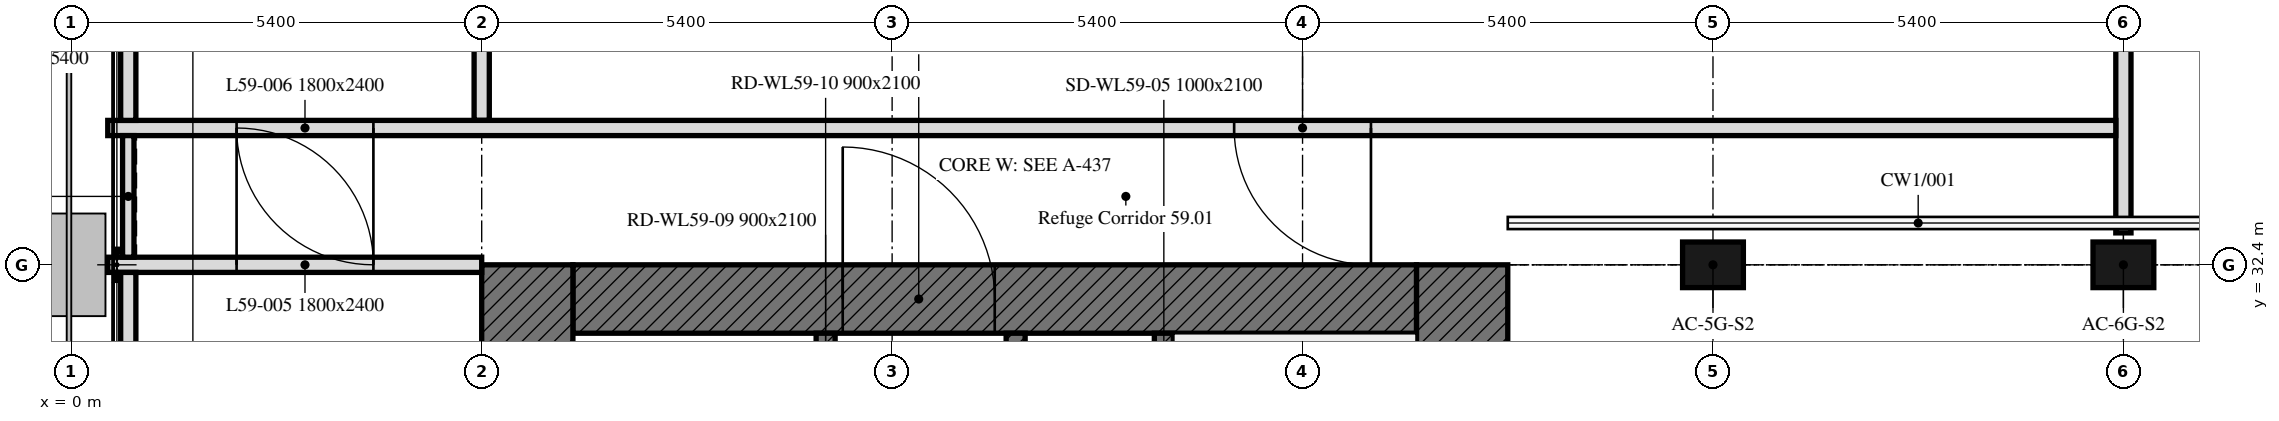
"""IFC4 building model, lengths in metres.
Left out: names, types, materials, properties, quantities, classifications, styles, units other than length and angle.
Written with IfcOpenShell. Run it as: python <this file> out.ifc"""

import sys

from ifc_helpers import new_model, si_unit, direction, frame, frame_2d, origin, origin_2d, place, context, subcontext, project, spatial, rectangle, extrude, element, fill, save


model = new_model("IFC4")
c1 = context("Model", 3, precision=1e-05, world=origin(), true_north=direction((0.0, 1.0)))
c2 = subcontext(c1, "Body", "Model", "MODEL_VIEW")
j1 = project(units=[si_unit("LENGTHUNIT", "METRE"), si_unit("PLANEANGLEUNIT", "RADIAN")], contexts=[c1])
p1 = place(None, origin())
s1 = spatial("IfcSite", under=j1, at=p1, CompositionType="ELEMENT")
p2 = place(p1, origin())
s2 = spatial("IfcBuilding", under=s1, at=p2, CompositionType="ELEMENT")
p3 = place(p2, frame((0.0, 0.0, 233.5)))
s3 = spatial("IfcBuildingStorey", under=s2, at=p3, CompositionType="ELEMENT", Elevation=233.5)
for number, where, z_axis, x_axis in (
    (1, (21.6, 32.4, 0.0), (0.0, 0.0, 1.0), (1.0, 0.0, 0.0)),
    (2, (27.0, 32.4, 0.0), (0.0, 0.0, 1.0), (1.0, 0.0, 0.0)),
):
    element("IfcColumn", number, at=place(p3, frame(where, z_axis=z_axis, x_axis=x_axis)), inside=s3, PredefinedType="COLUMN", context=c2, shape_type="SweptSolid", body=[
        extrude(rectangle(XDim=0.8, YDim=0.6, at=origin_2d()), origin(), (0.0, 0.0, 1.0), 9.3),
    ])
p4 = place(p3, frame((6.6, 31.95, 0.0), z_axis=(0.0, 0.0, 1.0), x_axis=(1.0, 0.0, 0.0)))
e3 = element("IfcWall", 3, at=p4, inside=s3, PredefinedType="SOLIDWALL", context=c2, shape_type="SweptSolid", body=[
    extrude(rectangle(XDim=11.1, YDim=0.9, at=frame_2d((5.55, 0.0))), origin(), (0.0, 0.0, 1.0), 9.3),
])
p5 = place(p4, frame((3.55, 0.0, 0.0)))
e4 = element("IfcOpeningElement", 4, at=p5, cuts=e3, PredefinedType="OPENING", context=c2, shape_type="SweptSolid", body=[
    extrude(rectangle(XDim=2.0, YDim=2.4, at=frame_2d((1.0, 1.2))), frame((0.0, 0.45, 0.0), z_axis=(0.0, -1.0, 0.0), x_axis=(1.0, 0.0, 0.0)), (0.0, 0.0, 1.0), 0.9),
])
for number, where, z_axis, x_axis in (
    (5, (6.0, 16.2, 0.0), (0.0, 0.0, 1.0), (0.0, 1.0, 0.0)),
    (6, (18.3, 32.4, 0.0), (0.0, 0.0, 1.0), (0.0, -1.0, 0.0)),
):
    element("IfcWall", number, at=place(p3, frame(where, z_axis=z_axis, x_axis=x_axis)), inside=s3, PredefinedType="SOLIDWALL", context=c2, shape_type="SweptSolid", body=[
        extrude(rectangle(XDim=16.2, YDim=1.2, at=frame_2d((8.1, 0.0))), origin(), (0.0, 0.0, 1.0), 9.3),
    ])
p6 = place(p3, frame((9.925, 17.1, 0.0), z_axis=(0.0, 0.0, 1.0), x_axis=(0.0, 1.0, 0.0)))
e7 = element("IfcWall", 7, at=p6, inside=s3, PredefinedType="SOLIDWALL", context=c2, shape_type="SweptSolid", body=[
    extrude(rectangle(XDim=14.4, YDim=0.25, at=frame_2d((7.2, 0.0))), origin(), (0.0, 0.0, 1.0), 9.3),
])
p7 = place(p6, frame((4.6, 0.0, 0.0)))
e8 = element("IfcOpeningElement", 8, at=p7, cuts=e7, PredefinedType="OPENING", context=c2, shape_type="SweptSolid", body=[
    extrude(rectangle(XDim=1.0, YDim=2.1, at=frame_2d((0.5, 1.05))), frame((0.0, 0.125, 0.0), z_axis=(0.0, -1.0, 0.0), x_axis=(1.0, 0.0, 0.0)), (0.0, 0.0, 1.0), 0.25),
])
p8 = place(p6, frame((7.062, 0.0, 0.0)))
e9 = element("IfcOpeningElement", 9, at=p8, cuts=e7, PredefinedType="OPENING", context=c2, shape_type="SweptSolid", body=[
    extrude(rectangle(XDim=1.2, YDim=2.1, at=frame_2d((0.6, 1.05))), frame((0.0, 0.125, 0.0), z_axis=(0.0, -1.0, 0.0), x_axis=(1.0, 0.0, 0.0)), (0.0, 0.0, 1.0), 0.25),
])
p9 = place(p6, frame((9.853, 0.0, 0.0)))
e10 = element("IfcOpeningElement", 10, at=p9, cuts=e7, PredefinedType="OPENING", context=c2, shape_type="SweptSolid", body=[
    extrude(rectangle(XDim=0.9, YDim=2.1, at=frame_2d((0.45, 1.05))), frame((0.0, 0.125, 0.0), z_axis=(0.0, -1.0, 0.0), x_axis=(1.0, 0.0, 0.0)), (0.0, 0.0, 1.0), 0.25),
])
p10 = place(p6, frame((11.667, 0.0, 0.0)))
e11 = element("IfcOpeningElement", 11, at=p10, cuts=e7, PredefinedType="OPENING", context=c2, shape_type="SweptSolid", body=[
    extrude(rectangle(XDim=0.9, YDim=2.1, at=frame_2d((0.45, 1.05))), frame((0.0, 0.125, 0.0), z_axis=(0.0, -1.0, 0.0), x_axis=(1.0, 0.0, 0.0)), (0.0, 0.0, 1.0), 0.25),
])
p11 = place(p6, frame((13.227, 0.0, 0.0)))
e12 = element("IfcOpeningElement", 12, at=p11, cuts=e7, PredefinedType="OPENING", context=c2, shape_type="SweptSolid", body=[
    extrude(rectangle(XDim=0.9, YDim=2.1, at=frame_2d((0.45, 1.05))), frame((0.0, 0.125, 0.0), z_axis=(0.0, -1.0, 0.0), x_axis=(1.0, 0.0, 0.0)), (0.0, 0.0, 1.0), 0.25),
])
p12 = place(p3, frame((14.375, 17.1, 0.0), z_axis=(0.0, 0.0, 1.0), x_axis=(0.0, 1.0, 0.0)))
e13 = element("IfcWall", 13, at=p12, inside=s3, PredefinedType="SOLIDWALL", context=c2, shape_type="SweptSolid", body=[
    extrude(rectangle(XDim=14.4, YDim=0.25, at=frame_2d((7.2, 0.0))), origin(), (0.0, 0.0, 1.0), 9.3),
])
p13 = place(p12, frame((13.15, 0.0, 0.0)))
e14 = element("IfcOpeningElement", 14, at=p13, cuts=e13, PredefinedType="OPENING", context=c2, shape_type="SweptSolid", body=[
    extrude(rectangle(XDim=1.0, YDim=2.1, at=frame_2d((0.5, 1.05))), frame((0.0, 0.125, 0.0), z_axis=(0.0, -1.0, 0.0), x_axis=(1.0, 0.0, 0.0)), (0.0, 0.0, 1.0), 0.25),
])
p14 = place(p3, frame((12.425, 29.4, 0.0), z_axis=(0.0, 0.0, 1.0), x_axis=(0.0, 1.0, 0.0)))
e15 = element("IfcWall", 15, at=p14, inside=s3, PredefinedType="SOLIDWALL", context=c2, shape_type="SweptSolid", body=[
    extrude(rectangle(XDim=2.1, YDim=0.25, at=frame_2d((1.05, 0.0))), origin(), (0.0, 0.0, 1.0), 9.3),
])
p15 = place(p14, frame((0.5, 0.0, 0.0)))
e16 = element("IfcOpeningElement", 16, at=p15, cuts=e15, PredefinedType="OPENING", context=c2, shape_type="SweptSolid", body=[
    extrude(rectangle(XDim=1.0, YDim=2.1, at=frame_2d((0.5, 1.05))), frame((0.0, 0.125, 0.0), z_axis=(0.0, -1.0, 0.0), x_axis=(1.0, 0.0, 0.0)), (0.0, 0.0, 1.0), 0.25),
])
p16 = place(p3, frame((5.4, 34.3, 0.0), z_axis=(0.0, 0.0, 1.0), x_axis=(0.0, 1.0, 0.0)))
e17 = element("IfcWall", 17, at=p16, inside=s3, PredefinedType="PARTITIONING", context=c2, shape_type="SweptSolid", body=[
    extrude(rectangle(XDim=3.049, YDim=0.2, at=frame_2d((1.525, 0.0))), origin(), (0.0, 0.0, 1.0), 9.3),
])
p17 = place(p3, frame((27.0, 37.25, 0.0), z_axis=(0.0, 0.0, 1.0), x_axis=(0.0, -1.0, 0.0)))
e18 = element("IfcWall", 18, at=p17, inside=s3, PredefinedType="PARTITIONING", context=c2, shape_type="SweptSolid", body=[
    extrude(rectangle(XDim=4.43, YDim=0.2, at=frame_2d((2.215, 0.0))), origin(), (0.0, 0.0, 1.0), 9.3),
])
p18 = place(p3, frame((0.48, 32.4, 0.0), z_axis=(0.0, 0.0, 1.0), x_axis=(1.0, 0.0, 0.0)))
e19 = element("IfcWall", 19, at=p18, inside=s3, PredefinedType="PARTITIONING", context=c2, shape_type="SweptSolid", body=[
    extrude(rectangle(XDim=4.92, YDim=0.2, at=frame_2d((2.46, 0.0))), origin(), (0.0, 0.0, 1.0), 8.55),
])
p19 = place(p18, frame((1.695, 0.0, 0.0)))
e20 = element("IfcOpeningElement", 20, at=p19, cuts=e19, PredefinedType="OPENING", context=c2, shape_type="SweptSolid", body=[
    extrude(rectangle(XDim=1.8, YDim=2.4, at=frame_2d((0.9, 1.2))), frame((0.0, 0.1, 0.0), z_axis=(0.0, -1.0, 0.0), x_axis=(1.0, 0.0, 0.0)), (0.0, 0.0, 1.0), 0.2),
])
p20 = place(p3, frame((26.9, 34.2, 0.0), z_axis=(0.0, 0.0, 1.0), x_axis=(-1.0, 0.0, 0.0)))
e21 = element("IfcWall", 21, at=p20, inside=s3, PredefinedType="PARTITIONING", context=c2, shape_type="SweptSolid", body=[
    extrude(rectangle(XDim=26.42, YDim=0.2, at=frame_2d((13.21, 0.0))), origin(), (0.0, 0.0, 1.0), 9.3),
])
p21 = place(p20, frame((22.925, 0.0, 0.0)))
e22 = element("IfcOpeningElement", 22, at=p21, cuts=e21, PredefinedType="OPENING", context=c2, shape_type="SweptSolid", body=[
    extrude(rectangle(XDim=1.8, YDim=2.4, at=frame_2d((0.9, 1.2))), frame((0.0, 0.1, 0.0), z_axis=(0.0, -1.0, 0.0), x_axis=(1.0, 0.0, 0.0)), (0.0, 0.0, 1.0), 0.2),
])
p22 = place(p20, frame((9.8, 0.0, 0.0)))
e23 = element("IfcOpeningElement", 23, at=p22, cuts=e21, PredefinedType="OPENING", context=c2, shape_type="SweptSolid", body=[
    extrude(rectangle(XDim=1.8, YDim=2.4, at=frame_2d((0.9, 1.2))), frame((0.0, 0.1, 0.0), z_axis=(0.0, -1.0, 0.0), x_axis=(1.0, 0.0, 0.0)), (0.0, 0.0, 1.0), 0.2),
])
p23 = place(p3, frame((0.75, 34.1, 0.0), z_axis=(0.0, 0.0, 1.0), x_axis=(0.0, -1.0, 0.0)))
e24 = element("IfcWall", 24, at=p23, inside=s3, PredefinedType="PARTITIONING", context=c2, shape_type="SweptSolid", body=[
    extrude(rectangle(XDim=1.6, YDim=0.15, at=frame_2d((0.8, 0.0))), origin(), (0.0, 0.0, 1.0), 9.3),
])
p24 = place(p3, frame((0.75, 32.3, 0.0), z_axis=(0.0, 0.0, 1.0), x_axis=(0.0, -1.0, 0.0)))
e25 = element("IfcWall", 25, at=p24, inside=s3, PredefinedType="PARTITIONING", context=c2, shape_type="SweptSolid", body=[
    extrude(rectangle(XDim=16.2, YDim=0.2, at=frame_2d((8.1, 0.0))), origin(), (0.0, 0.0, 1.0), 9.3),
])
p25 = place(p3, frame((0.75, 37.389, 0.0), z_axis=(0.0, 0.0, 1.0), x_axis=(0.0, -1.0, 0.0)))
e26 = element("IfcWall", 26, at=p25, inside=s3, PredefinedType="PARTITIONING", context=c2, shape_type="SweptSolid", body=[
    extrude(rectangle(XDim=3.089, YDim=0.2, at=frame_2d((1.544, 0.0))), origin(), (0.0, 0.0, 1.0), 9.3),
])
p26 = place(p5, origin())
e27 = element("IfcDoor", 27, at=p26, inside=s3, OperationType="DOUBLE_DOOR_SINGLE_SWING", PredefinedType="DOOR", context=c2, shape_type="SweptSolid", body=[
    extrude(rectangle(XDim=2.0, YDim=2.4, at=frame_2d((1.0, 1.2))), frame((0.0, 0.025, 0.0), z_axis=(0.0, -1.0, 0.0), x_axis=(1.0, 0.0, 0.0)), (0.0, 0.0, 1.0), 0.05),
])
fill(e4, e27)
p27 = place(p19, origin())
e28 = element("IfcDoor", 28, at=p27, inside=s3, OperationType="DOUBLE_DOOR_SINGLE_SWING", PredefinedType="DOOR", context=c2, shape_type="SweptSolid", body=[
    extrude(rectangle(XDim=1.8, YDim=2.4, at=frame_2d((0.9, 1.2))), frame((0.0, 0.025, 0.0), z_axis=(0.0, -1.0, 0.0), x_axis=(1.0, 0.0, 0.0)), (0.0, 0.0, 1.0), 0.05),
])
fill(e20, e28)
p28 = place(p21, origin())
e29 = element("IfcDoor", 29, at=p28, inside=s3, OperationType="DOUBLE_DOOR_SINGLE_SWING", PredefinedType="DOOR", context=c2, shape_type="SweptSolid", body=[
    extrude(rectangle(XDim=1.8, YDim=2.4, at=frame_2d((0.9, 1.2))), frame((0.0, 0.025, 0.0), z_axis=(0.0, -1.0, 0.0), x_axis=(1.0, 0.0, 0.0)), (0.0, 0.0, 1.0), 0.05),
])
fill(e22, e29)
p29 = place(p22, origin())
e30 = element("IfcDoor", 30, at=p29, inside=s3, OperationType="DOUBLE_DOOR_SINGLE_SWING", PredefinedType="DOOR", context=c2, shape_type="SweptSolid", body=[
    extrude(rectangle(XDim=1.8, YDim=2.4, at=frame_2d((0.9, 1.2))), frame((0.0, 0.025, 0.0), z_axis=(0.0, -1.0, 0.0), x_axis=(1.0, 0.0, 0.0)), (0.0, 0.0, 1.0), 0.05),
])
fill(e23, e30)
save(model, sys.argv[1])
